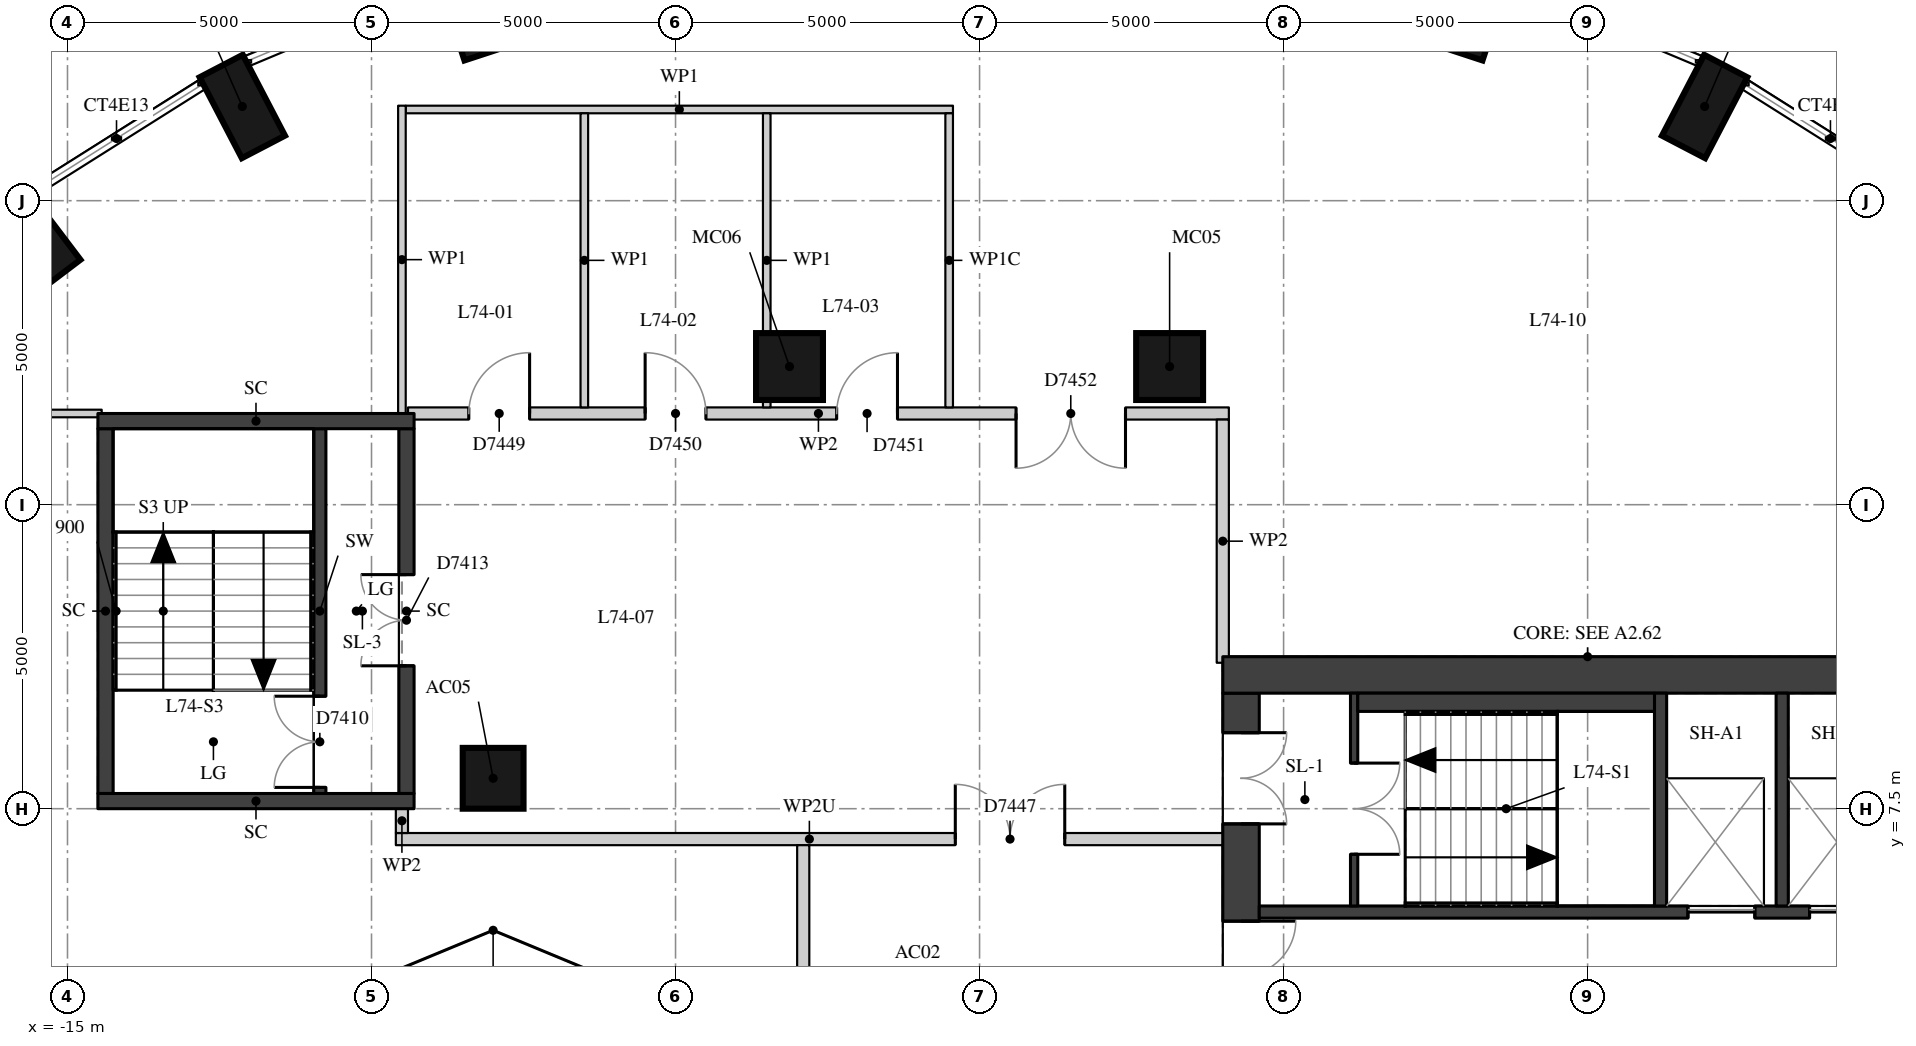
"""IFC4 building model, lengths in metres.
Left out: names, types, materials, properties, quantities, classifications, styles, units other than length and angle.
Written with IfcOpenShell. Run it as: python <this file> out.ifc"""

import sys

from ifc_helpers import new_model, si_unit, direction, frame, frame_2d, origin, origin_2d, place, context, subcontext, project, spatial, rectangle, extrude, element, fill, save


model = new_model("IFC4")
c1 = context("Model", 3, precision=1e-05, world=origin(), true_north=direction((0.0, 1.0)))
c2 = subcontext(c1, "Body", "Model", "MODEL_VIEW")
j1 = project(units=[si_unit("LENGTHUNIT", "METRE"), si_unit("PLANEANGLEUNIT", "RADIAN")], contexts=[c1])
p1 = place(None, origin())
s1 = spatial("IfcSite", under=j1, at=p1, CompositionType="ELEMENT")
p2 = place(p1, origin())
s2 = spatial("IfcBuilding", under=s1, at=p2, CompositionType="ELEMENT")
p3 = place(p2, frame((0.0, 0.0, 259.7)))
s3 = spatial("IfcBuildingStorey", under=s2, at=p3, CompositionType="ELEMENT", Elevation=259.7)
for number, where, z_axis, x_axis in (
    (1, (11.925, 19.05, 0.0), (0.0, 0.0, 1.0), (0.462, 0.887, 0.0)),
    (2, (8.125, 20.644, 0.0), (0.0, 0.0, 1.0), (0.312, 0.95, 0.0)),
    (3, (-8.326, 20.644, 0.0), (0.0, 0.0, 1.0), (-0.312, 0.95, 0.0)),
    (4, (-12.125, 19.05, 0.0), (0.0, 0.0, 1.0), (-0.462, 0.887, 0.0)),
    (5, (-15.559, 16.885, 0.0), (0.0, 0.0, 1.0), (-0.604, 0.797, 0.0)),
):
    element("IfcColumn", number, at=place(p3, frame(where, z_axis=z_axis, x_axis=x_axis)), inside=s3, PredefinedType="COLUMN", context=c2, shape_type="SweptSolid", body=[
        extrude(rectangle(XDim=1.5, YDim=0.8, at=origin_2d()), origin(), (0.0, 0.0, 1.0), 4.5),
    ])
p4 = place(p3, frame((-8.0, 8.0, 0.0), z_axis=(0.0, 0.0, 1.0), x_axis=(1.0, 0.0, 0.0)))
e6 = element("IfcColumn", 6, at=p4, inside=s3, PredefinedType="COLUMN", context=c2, shape_type="SweptSolid", body=[
    extrude(rectangle(XDim=1.0, YDim=1.0, at=origin_2d()), origin(), (0.0, 0.0, 1.0), 4.5),
])
for number, where, z_axis, x_axis in (
    (7, (3.126, 14.772, 0.0), (0.0, 0.0, 1.0), (1.0, 0.0, 0.0)),
    (8, (-3.126, 14.772, 0.0), (0.0, 0.0, 1.0), (1.0, 0.0, 0.0)),
):
    element("IfcColumn", number, at=place(p3, frame(where, z_axis=z_axis, x_axis=x_axis)), inside=s3, PredefinedType="COLUMN", context=c2, shape_type="SweptSolid", body=[
        extrude(rectangle(XDim=1.1, YDim=1.1, at=origin_2d()), origin(), (0.0, 0.0, 1.0), 4.5),
    ])
p5 = place(p3, frame((4.3, -9.4, 0.0), z_axis=(0.0, 0.0, 1.0), x_axis=(0.0, 1.0, 0.0)))
e9 = element("IfcWall", 9, at=p5, inside=s3, PredefinedType="SHEAR", context=c2, shape_type="SweptSolid", body=[
    extrude(rectangle(XDim=18.8, YDim=0.6, at=frame_2d((9.4, 0.0))), origin(), (0.0, 0.0, 1.0), 4.15),
])
p6 = place(p5, frame((0.65, 0.0, 0.0)))
e10 = element("IfcOpeningElement", 10, at=p6, cuts=e9, PredefinedType="OPENING", context=c2, shape_type="SweptSolid", body=[
    extrude(rectangle(XDim=1.5, YDim=2.1, at=frame_2d((0.75, 1.05))), frame((0.0, 0.31, 0.0), z_axis=(0.0, -1.0, 0.0), x_axis=(1.0, 0.0, 0.0)), (0.0, 0.0, 1.0), 0.62),
])
p7 = place(p5, frame((3.75, 0.0, 0.0)))
e11 = element("IfcOpeningElement", 11, at=p7, cuts=e9, PredefinedType="OPENING", context=c2, shape_type="SweptSolid", body=[
    extrude(rectangle(XDim=1.8, YDim=2.1, at=frame_2d((0.9, 1.05))), frame((0.0, 0.31, 0.0), z_axis=(0.0, -1.0, 0.0), x_axis=(1.0, 0.0, 0.0)), (0.0, 0.0, 1.0), 0.62),
])
p8 = place(p5, frame((6.25, 0.0, 0.0)))
e12 = element("IfcOpeningElement", 12, at=p8, cuts=e9, PredefinedType="OPENING", context=c2, shape_type="SweptSolid", body=[
    extrude(rectangle(XDim=1.1, YDim=2.1, at=frame_2d((0.55, 1.05))), frame((0.0, 0.31, 0.0), z_axis=(0.0, -1.0, 0.0), x_axis=(1.0, 0.0, 0.0)), (0.0, 0.0, 1.0), 0.62),
])
p9 = place(p5, frame((8.9, 0.0, 0.0)))
e13 = element("IfcOpeningElement", 13, at=p9, cuts=e9, PredefinedType="OPENING", context=c2, shape_type="SweptSolid", body=[
    extrude(rectangle(XDim=1.0, YDim=2.1, at=frame_2d((0.5, 1.05))), frame((0.0, 0.31, 0.0), z_axis=(0.0, -1.0, 0.0), x_axis=(1.0, 0.0, 0.0)), (0.0, 0.0, 1.0), 0.62),
])
p10 = place(p5, frame((11.45, 0.0, 0.0)))
e14 = element("IfcOpeningElement", 14, at=p10, cuts=e9, PredefinedType="OPENING", context=c2, shape_type="SweptSolid", body=[
    extrude(rectangle(XDim=1.1, YDim=2.1, at=frame_2d((0.55, 1.05))), frame((0.0, 0.31, 0.0), z_axis=(0.0, -1.0, 0.0), x_axis=(1.0, 0.0, 0.0)), (0.0, 0.0, 1.0), 0.62),
])
p11 = place(p5, frame((13.25, 0.0, 0.0)))
e15 = element("IfcOpeningElement", 15, at=p11, cuts=e9, PredefinedType="OPENING", context=c2, shape_type="SweptSolid", body=[
    extrude(rectangle(XDim=1.8, YDim=2.1, at=frame_2d((0.9, 1.05))), frame((0.0, 0.31, 0.0), z_axis=(0.0, -1.0, 0.0), x_axis=(1.0, 0.0, 0.0)), (0.0, 0.0, 1.0), 0.62),
])
p12 = place(p5, frame((16.65, 0.0, 0.0)))
e16 = element("IfcOpeningElement", 16, at=p12, cuts=e9, PredefinedType="OPENING", context=c2, shape_type="SweptSolid", body=[
    extrude(rectangle(XDim=1.5, YDim=2.1, at=frame_2d((0.75, 1.05))), frame((0.0, 0.31, 0.0), z_axis=(0.0, -1.0, 0.0), x_axis=(1.0, 0.0, 0.0)), (0.0, 0.0, 1.0), 0.62),
])
p13 = place(p3, frame((4.0, 9.7, 0.0), z_axis=(0.0, 0.0, 1.0), x_axis=(1.0, 0.0, 0.0)))
e17 = element("IfcWall", 17, at=p13, inside=s3, PredefinedType="SHEAR", context=c2, shape_type="SweptSolid", body=[
    extrude(rectangle(XDim=12.0, YDim=0.6, at=frame_2d((6.0, 0.0))), origin(), (0.0, 0.0, 1.0), 4.15),
])
p14 = place(p3, frame((4.6, 5.8, 0.0), z_axis=(0.0, 0.0, 1.0), x_axis=(1.0, 0.0, 0.0)))
e18 = element("IfcWall", 18, at=p14, inside=s3, PredefinedType="SHEAR", context=c2, shape_type="SweptSolid", body=[
    extrude(rectangle(XDim=10.8, YDim=0.2, at=frame_2d((5.4, 0.0))), origin(), (0.0, 0.0, 1.0), 4.15),
])
p15 = place(p14, frame((7.05, 0.0, 0.0)))
e19 = element("IfcOpeningElement", 19, at=p15, cuts=e18, PredefinedType="OPENING", context=c2, shape_type="SweptSolid", body=[
    extrude(rectangle(XDim=1.1, YDim=2.1, at=frame_2d((0.55, 1.05))), frame((0.0, 0.11, 0.0), z_axis=(0.0, -1.0, 0.0), x_axis=(1.0, 0.0, 0.0)), (0.0, 0.0, 1.0), 0.22),
])
p16 = place(p14, frame((9.05, 0.0, 0.0)))
e20 = element("IfcOpeningElement", 20, at=p16, cuts=e18, PredefinedType="OPENING", context=c2, shape_type="SweptSolid", body=[
    extrude(rectangle(XDim=1.1, YDim=2.1, at=frame_2d((0.55, 1.05))), frame((0.0, 0.11, 0.0), z_axis=(0.0, -1.0, 0.0), x_axis=(1.0, 0.0, 0.0)), (0.0, 0.0, 1.0), 0.22),
])
for number, where, z_axis, x_axis in (
    (21, (11.2, 5.9, 0.0), (0.0, 0.0, 1.0), (0.0, 1.0, 0.0)),
    (22, (13.2, 5.9, 0.0), (0.0, 0.0, 1.0), (0.0, 1.0, 0.0)),
):
    element("IfcWall", number, at=place(p3, frame(where, z_axis=z_axis, x_axis=x_axis)), inside=s3, PredefinedType="SHEAR", context=c2, shape_type="SweptSolid", body=[
        extrude(rectangle(XDim=3.5, YDim=0.2, at=frame_2d((1.75, 0.0))), origin(), (0.0, 0.0, 1.0), 4.15),
    ])
p17 = place(p3, frame((6.16, 5.9, 0.0), z_axis=(0.0, 0.0, 1.0), x_axis=(0.0, 1.0, 0.0)))
e23 = element("IfcWall", 23, at=p17, inside=s3, PredefinedType="SHEAR", context=c2, shape_type="SweptSolid", body=[
    extrude(rectangle(XDim=3.5, YDim=0.12, at=frame_2d((1.75, 0.0))), origin(), (0.0, 0.0, 1.0), 4.15),
])
p18 = place(p17, frame((0.85, 0.0, 0.0)))
e24 = element("IfcOpeningElement", 24, at=p18, cuts=e23, PredefinedType="OPENING", context=c2, shape_type="SweptSolid", body=[
    extrude(rectangle(XDim=1.5, YDim=2.1, at=frame_2d((0.75, 1.05))), frame((0.0, 0.07, 0.0), z_axis=(0.0, -1.0, 0.0), x_axis=(1.0, 0.0, 0.0)), (0.0, 0.0, 1.0), 0.14),
])
p19 = place(p3, frame((-10.85, 7.75, 0.0), z_axis=(0.0, 0.0, 1.0), x_axis=(0.0, 1.0, 0.0)))
e25 = element("IfcWall", 25, at=p19, inside=s3, PredefinedType="SHEAR", context=c2, shape_type="SweptSolid", body=[
    extrude(rectangle(XDim=6.0, YDim=0.2, at=frame_2d((3.0, 0.0))), origin(), (0.0, 0.0, 1.0), 4.15),
])
p20 = place(p19, frame((0.1, 0.0, 0.0)))
e26 = element("IfcOpeningElement", 26, at=p20, cuts=e25, PredefinedType="OPENING", context=c2, shape_type="SweptSolid", body=[
    extrude(rectangle(XDim=1.5, YDim=2.1, at=frame_2d((0.75, 1.05))), frame((0.0, 0.11, 0.0), z_axis=(0.0, -1.0, 0.0), x_axis=(1.0, 0.0, 0.0)), (0.0, 0.0, 1.0), 0.22),
])
p21 = place(p3, frame((6.22, 9.25, 0.0), z_axis=(0.0, 0.0, 1.0), x_axis=(1.0, 0.0, 0.0)))
e27 = element("IfcWall", 27, at=p21, inside=s3, PredefinedType="PARTITIONING", context=c2, shape_type="SweptSolid", body=[
    extrude(rectangle(XDim=4.88, YDim=0.3, at=frame_2d((2.44, 0.0))), origin(), (0.0, 0.0, 1.0), 4.15),
])
p22 = place(p3, frame((-14.375, 7.75, -0.35), z_axis=(0.0, 0.0, 1.0), x_axis=(0.0, 1.0, 0.0)))
e28 = element("IfcWall", 28, at=p22, inside=s3, PredefinedType="SHEAR", context=c2, shape_type="SweptSolid", body=[
    extrude(rectangle(XDim=6.0, YDim=0.25, at=frame_2d((3.0, 0.0))), origin(), (0.0, 0.0, 1.0), 4.5),
])
p23 = place(p3, frame((-9.425, 7.75, -0.35), z_axis=(0.0, 0.0, 1.0), x_axis=(0.0, 1.0, 0.0)))
e29 = element("IfcWall", 29, at=p23, inside=s3, PredefinedType="SHEAR", context=c2, shape_type="SweptSolid", body=[
    extrude(rectangle(XDim=6.0, YDim=0.25, at=frame_2d((3.0, 0.0))), origin(), (0.0, 0.0, 1.0), 4.5),
])
p24 = place(p23, frame((2.1, 0.0, 0.35)))
e30 = element("IfcOpeningElement", 30, at=p24, cuts=e29, PredefinedType="OPENING", context=c2, shape_type="SweptSolid", body=[
    extrude(rectangle(XDim=1.5, YDim=2.1, at=frame_2d((0.75, 1.05))), frame((0.0, 0.135, 0.0), z_axis=(0.0, -1.0, 0.0), x_axis=(1.0, 0.0, 0.0)), (0.0, 0.0, 1.0), 0.27),
])
for number, where, z_axis, x_axis in (
    (31, (-14.5, 13.875, -0.35), (0.0, 0.0, 1.0), (1.0, 0.0, 0.0)),
    (32, (-14.5, 7.625, -0.35), (0.0, 0.0, 1.0), (1.0, 0.0, 0.0)),
):
    element("IfcWall", number, at=place(p3, frame(where, z_axis=z_axis, x_axis=x_axis)), inside=s3, PredefinedType="SHEAR", context=c2, shape_type="SweptSolid", body=[
        extrude(rectangle(XDim=5.2, YDim=0.25, at=frame_2d((2.6, 0.0))), origin(), (0.0, 0.0, 1.0), 4.5),
    ])
p25 = place(p3, frame((-9.6, 7.0, 0.0), z_axis=(0.0, 0.0, 1.0), x_axis=(1.0, 0.0, 0.0)))
e33 = element("IfcWall", 33, at=p25, inside=s3, PredefinedType="PARTITIONING", context=c2, shape_type="SweptSolid", body=[
    extrude(rectangle(XDim=13.602, YDim=0.2, at=frame_2d((6.801, 0.0))), origin(), (0.0, 0.0, 1.0), 3.6),
])
p26 = place(p25, frame((9.201, 0.0, 0.0)))
e34 = element("IfcOpeningElement", 34, at=p26, cuts=e33, PredefinedType="OPENING", context=c2, shape_type="SweptSolid", body=[
    extrude(rectangle(XDim=1.8, YDim=2.1, at=frame_2d((0.9, 1.05))), frame((0.0, 0.11, 0.0), z_axis=(0.0, -1.0, 0.0), x_axis=(1.0, 0.0, 0.0)), (0.0, 0.0, 1.0), 0.22),
])
p27 = place(p3, frame((-19.121, 14.0, 0.0), z_axis=(0.0, 0.0, 1.0), x_axis=(1.0, 0.0, 0.0)))
e35 = element("IfcWall", 35, at=p27, inside=s3, PredefinedType="PARTITIONING", context=c2, shape_type="SweptSolid", body=[
    extrude(rectangle(XDim=4.684, YDim=0.125, at=frame_2d((2.342, 0.0))), origin(), (0.0, 0.0, 1.0), 4.15),
])
p28 = place(p27, frame((1.692, 0.0, 0.0)))
e36 = element("IfcOpeningElement", 36, at=p28, cuts=e35, PredefinedType="OPENING", context=c2, shape_type="SweptSolid", body=[
    extrude(rectangle(XDim=1.8, YDim=2.1, at=frame_2d((0.9, 1.05))), frame((0.0, 0.073, 0.0), z_axis=(0.0, -1.0, 0.0), x_axis=(1.0, 0.0, 0.0)), (0.0, 0.0, 1.0), 0.145),
])
p29 = place(p3, frame((-9.4, 14.0, 0.0), z_axis=(0.0, 0.0, 1.0), x_axis=(1.0, 0.0, 0.0)))
e37 = element("IfcWall", 37, at=p29, inside=s3, PredefinedType="PARTITIONING", context=c2, shape_type="SweptSolid", body=[
    extrude(rectangle(XDim=13.5, YDim=0.2, at=frame_2d((6.75, 0.0))), origin(), (0.0, 0.0, 1.0), 4.15),
])
p30 = place(p29, frame((10.0, 0.0, 0.0)))
e38 = element("IfcOpeningElement", 38, at=p30, cuts=e37, PredefinedType="OPENING", context=c2, shape_type="SweptSolid", body=[
    extrude(rectangle(XDim=1.8, YDim=2.1, at=frame_2d((0.9, 1.05))), frame((0.0, 0.11, 0.0), z_axis=(0.0, -1.0, 0.0), x_axis=(1.0, 0.0, 0.0)), (0.0, 0.0, 1.0), 0.22),
])
p31 = place(p29, frame((1.0, 0.0, 0.0)))
e39 = element("IfcOpeningElement", 39, at=p31, cuts=e37, PredefinedType="OPENING", context=c2, shape_type="SweptSolid", body=[
    extrude(rectangle(XDim=1.0, YDim=2.1, at=frame_2d((0.5, 1.05))), frame((0.0, 0.11, 0.0), z_axis=(0.0, -1.0, 0.0), x_axis=(1.0, 0.0, 0.0)), (0.0, 0.0, 1.0), 0.22),
])
p32 = place(p29, frame((3.9, 0.0, 0.0)))
e40 = element("IfcOpeningElement", 40, at=p32, cuts=e37, PredefinedType="OPENING", context=c2, shape_type="SweptSolid", body=[
    extrude(rectangle(XDim=1.0, YDim=2.1, at=frame_2d((0.5, 1.05))), frame((0.0, 0.11, 0.0), z_axis=(0.0, -1.0, 0.0), x_axis=(1.0, 0.0, 0.0)), (0.0, 0.0, 1.0), 0.22),
])
p33 = place(p29, frame((7.05, 0.0, 0.0)))
e41 = element("IfcOpeningElement", 41, at=p33, cuts=e37, PredefinedType="OPENING", context=c2, shape_type="SweptSolid", body=[
    extrude(rectangle(XDim=1.0, YDim=2.1, at=frame_2d((0.5, 1.05))), frame((0.0, 0.11, 0.0), z_axis=(0.0, -1.0, 0.0), x_axis=(1.0, 0.0, 0.0)), (0.0, 0.0, 1.0), 0.22),
])
p34 = place(p3, frame((-9.438, 19.0, 0.0), z_axis=(0.0, 0.0, 1.0), x_axis=(1.0, 0.0, 0.0)))
e42 = element("IfcWall", 42, at=p34, inside=s3, PredefinedType="PARTITIONING", context=c2, shape_type="SweptSolid", body=[
    extrude(rectangle(XDim=9.0, YDim=0.125, at=frame_2d((4.5, 0.0))), origin(), (0.0, 0.0, 1.0), 4.15),
])
p35 = place(p3, frame((-9.5, 7.1, 0.0), z_axis=(0.0, 0.0, 1.0), x_axis=(0.0, 1.0, 0.0)))
e43 = element("IfcWall", 43, at=p35, inside=s3, PredefinedType="PARTITIONING", context=c2, shape_type="SweptSolid", body=[
    extrude(rectangle(XDim=0.402, YDim=0.2, at=frame_2d((0.201, 0.0))), origin(), (0.0, 0.0, 1.0), 4.15),
])
p36 = place(p3, frame((-9.5, 13.998, 0.0), z_axis=(0.0, 0.0, 1.0), x_axis=(0.0, 1.0, 0.0)))
e44 = element("IfcWall", 44, at=p36, inside=s3, PredefinedType="PARTITIONING", context=c2, shape_type="SweptSolid", body=[
    extrude(rectangle(XDim=5.064, YDim=0.125, at=frame_2d((2.532, 0.0))), origin(), (0.0, 0.0, 1.0), 4.15),
])
for number, where, z_axis, x_axis in (
    (45, (-6.5, 14.1, 0.0), (0.0, 0.0, 1.0), (0.0, 1.0, 0.0)),
    (46, (-3.5, 14.1, 0.0), (0.0, 0.0, 1.0), (0.0, 1.0, 0.0)),
):
    element("IfcWall", number, at=place(p3, frame(where, z_axis=z_axis, x_axis=x_axis)), inside=s3, PredefinedType="PARTITIONING", context=c2, shape_type="SweptSolid", body=[
        extrude(rectangle(XDim=4.837, YDim=0.125, at=frame_2d((2.419, 0.0))), origin(), (0.0, 0.0, 1.0), 4.15),
    ])
p37 = place(p3, frame((-2.9, 0.866, 0.0), z_axis=(0.0, 0.0, 1.0), x_axis=(0.0, 1.0, 0.0)))
e47 = element("IfcWall", 47, at=p37, inside=s3, PredefinedType="PARTITIONING", context=c2, shape_type="SweptSolid", body=[
    extrude(rectangle(XDim=6.034, YDim=0.2, at=frame_2d((3.017, 0.0))), origin(), (0.0, 0.0, 1.0), 4.15),
])
p38 = place(p3, frame((-0.5, 14.1, 0.0), z_axis=(0.0, 0.0, 1.0), x_axis=(0.0, 1.0, 0.0)))
e48 = element("IfcWall", 48, at=p38, inside=s3, PredefinedType="PARTITIONING", context=c2, shape_type="SweptSolid", body=[
    extrude(rectangle(XDim=4.837, YDim=0.125, at=frame_2d((2.419, 0.0))), origin(), (0.0, 0.0, 1.0), 3.7),
])
p39 = place(p3, frame((4.0, 9.9, 0.0), z_axis=(0.0, 0.0, 1.0), x_axis=(0.0, 1.0, 0.0)))
e49 = element("IfcWall", 49, at=p39, inside=s3, PredefinedType="PARTITIONING", context=c2, shape_type="SweptSolid", body=[
    extrude(rectangle(XDim=4.0, YDim=0.2, at=frame_2d((2.0, 0.0))), origin(), (0.0, 0.0, 1.0), 4.15),
])
p40 = place(p11, origin())
e50 = element("IfcDoor", 50, at=p40, inside=s3, OperationType="DOUBLE_DOOR_SINGLE_SWING", PredefinedType="DOOR", context=c2, shape_type="SweptSolid", body=[
    extrude(rectangle(XDim=1.8, YDim=2.1, at=frame_2d((0.9, 1.05))), frame((0.0, 0.025, 0.0), z_axis=(0.0, -1.0, 0.0), x_axis=(1.0, 0.0, 0.0)), (0.0, 0.0, 1.0), 0.05),
])
fill(e15, e50)
p41 = place(p12, origin())
e51 = element("IfcDoor", 51, at=p41, inside=s3, OperationType="DOUBLE_DOOR_SINGLE_SWING", PredefinedType="DOOR", context=c2, shape_type="SweptSolid", body=[
    extrude(rectangle(XDim=1.5, YDim=2.1, at=frame_2d((0.75, 1.05))), frame((0.0, 0.025, 0.0), z_axis=(0.0, -1.0, 0.0), x_axis=(1.0, 0.0, 0.0)), (0.0, 0.0, 1.0), 0.05),
])
fill(e16, e51)
p42 = place(p18, origin())
e52 = element("IfcDoor", 52, at=p42, inside=s3, OperationType="DOUBLE_DOOR_SINGLE_SWING", PredefinedType="DOOR", context=c2, shape_type="SweptSolid", body=[
    extrude(rectangle(XDim=1.5, YDim=2.1, at=frame_2d((0.75, 1.05))), frame((0.0, 0.025, 0.0), z_axis=(0.0, -1.0, 0.0), x_axis=(1.0, 0.0, 0.0)), (0.0, 0.0, 1.0), 0.05),
])
fill(e24, e52)
p43 = place(p20, origin())
e53 = element("IfcDoor", 53, at=p43, inside=s3, OperationType="DOUBLE_DOOR_SINGLE_SWING", PredefinedType="DOOR", context=c2, shape_type="SweptSolid", body=[
    extrude(rectangle(XDim=1.5, YDim=2.1, at=frame_2d((0.75, 1.05))), frame((0.0, 0.025, 0.0), z_axis=(0.0, -1.0, 0.0), x_axis=(1.0, 0.0, 0.0)), (0.0, 0.0, 1.0), 0.05),
])
fill(e26, e53)
p44 = place(p15, origin())
e54 = element("IfcDoor", 54, at=p44, inside=s3, OperationType="DOUBLE_DOOR_SLIDING", PredefinedType="DOOR", context=c2, shape_type="SweptSolid", body=[
    extrude(rectangle(XDim=1.1, YDim=2.1, at=frame_2d((0.55, 1.05))), frame((0.0, 0.025, 0.0), z_axis=(0.0, -1.0, 0.0), x_axis=(1.0, 0.0, 0.0)), (0.0, 0.0, 1.0), 0.05),
])
fill(e19, e54)
p45 = place(p16, origin())
e55 = element("IfcDoor", 55, at=p45, inside=s3, OperationType="DOUBLE_DOOR_SLIDING", PredefinedType="DOOR", context=c2, shape_type="SweptSolid", body=[
    extrude(rectangle(XDim=1.1, YDim=2.1, at=frame_2d((0.55, 1.05))), frame((0.0, 0.025, 0.0), z_axis=(0.0, -1.0, 0.0), x_axis=(1.0, 0.0, 0.0)), (0.0, 0.0, 1.0), 0.05),
])
fill(e20, e55)
p46 = place(p24, origin())
e56 = element("IfcDoor", 56, at=p46, inside=s3, OperationType="DOUBLE_DOOR_SINGLE_SWING", PredefinedType="DOOR", context=c2, shape_type="SweptSolid", body=[
    extrude(rectangle(XDim=1.5, YDim=2.1, at=frame_2d((0.75, 1.05))), frame((0.0, 0.025, 0.0), z_axis=(0.0, -1.0, 0.0), x_axis=(1.0, 0.0, 0.0)), (0.0, 0.0, 1.0), 0.05),
])
fill(e30, e56)
p47 = place(p30, origin())
e57 = element("IfcDoor", 57, at=p47, inside=s3, OperationType="DOUBLE_DOOR_SINGLE_SWING", PredefinedType="DOOR", context=c2, shape_type="SweptSolid", body=[
    extrude(rectangle(XDim=1.8, YDim=2.1, at=frame_2d((0.9, 1.05))), frame((0.0, 0.025, 0.0), z_axis=(0.0, -1.0, 0.0), x_axis=(1.0, 0.0, 0.0)), (0.0, 0.0, 1.0), 0.05),
])
fill(e38, e57)
p48 = place(p26, origin())
e58 = element("IfcDoor", 58, at=p48, inside=s3, OperationType="DOUBLE_DOOR_SINGLE_SWING", PredefinedType="DOOR", context=c2, shape_type="SweptSolid", body=[
    extrude(rectangle(XDim=1.8, YDim=2.1, at=frame_2d((0.9, 1.05))), frame((0.0, 0.025, 0.0), z_axis=(0.0, -1.0, 0.0), x_axis=(1.0, 0.0, 0.0)), (0.0, 0.0, 1.0), 0.05),
])
fill(e34, e58)
p49 = place(p31, origin())
e59 = element("IfcDoor", 59, at=p49, inside=s3, OperationType="SINGLE_SWING_RIGHT", PredefinedType="DOOR", context=c2, shape_type="SweptSolid", body=[
    extrude(rectangle(XDim=1.0, YDim=2.1, at=frame_2d((0.5, 1.05))), frame((0.0, 0.025, 0.0), z_axis=(0.0, -1.0, 0.0), x_axis=(1.0, 0.0, 0.0)), (0.0, 0.0, 1.0), 0.05),
])
fill(e39, e59)
p50 = place(p32, origin())
e60 = element("IfcDoor", 60, at=p50, inside=s3, OperationType="SINGLE_SWING_LEFT", PredefinedType="DOOR", context=c2, shape_type="SweptSolid", body=[
    extrude(rectangle(XDim=1.0, YDim=2.1, at=frame_2d((0.5, 1.05))), frame((0.0, 0.025, 0.0), z_axis=(0.0, -1.0, 0.0), x_axis=(1.0, 0.0, 0.0)), (0.0, 0.0, 1.0), 0.05),
])
fill(e40, e60)
p51 = place(p33, origin())
e61 = element("IfcDoor", 61, at=p51, inside=s3, OperationType="SINGLE_SWING_RIGHT", PredefinedType="DOOR", context=c2, shape_type="SweptSolid", body=[
    extrude(rectangle(XDim=1.0, YDim=2.1, at=frame_2d((0.5, 1.05))), frame((0.0, 0.025, 0.0), z_axis=(0.0, -1.0, 0.0), x_axis=(1.0, 0.0, 0.0)), (0.0, 0.0, 1.0), 0.05),
])
fill(e41, e61)
save(model, sys.argv[1])
